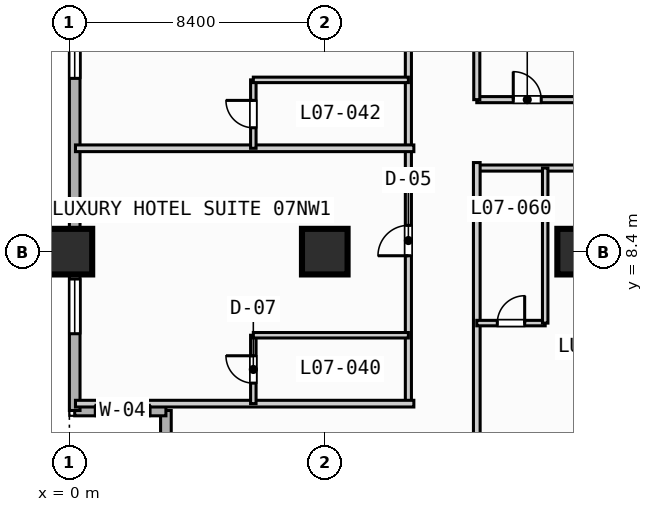
"""IFC4 building model, lengths in metres.
Left out: names, types, materials, properties, quantities, classifications, styles, units other than length and angle.
Written with IfcOpenShell. Run it as: python <this file> out.ifc"""

import sys

from ifc_helpers import new_model, si_unit, direction, frame, frame_2d, origin, origin_2d, place, context, subcontext, project, spatial, rectangle, extrude, element, fill, save


model = new_model("IFC4")
c1 = context("Model", 3, precision=1e-05, world=origin(), true_north=direction((0.0, 1.0)))
c2 = subcontext(c1, "Body", "Model", "MODEL_VIEW")
j1 = project(units=[si_unit("LENGTHUNIT", "METRE"), si_unit("PLANEANGLEUNIT", "RADIAN")], contexts=[c1])
p1 = place(None, origin())
s1 = spatial("IfcSite", under=j1, at=p1, CompositionType="ELEMENT")
p2 = place(p1, origin())
s2 = spatial("IfcBuilding", under=s1, at=p2, CompositionType="ELEMENT")
p3 = place(p2, frame((0.0, 0.0, 35.8)))
s3 = spatial("IfcBuildingStorey", under=s2, at=p3, CompositionType="ELEMENT", Elevation=35.8)
for number, where, z_axis, x_axis in (
    (1, (0.0, 8.4, 0.0), (0.0, 0.0, 1.0), (1.0, 0.0, 0.0)),
    (2, (8.4, 8.4, 0.0), (0.0, 0.0, 1.0), (1.0, 0.0, 0.0)),
    (3, (16.8, 8.4, 0.0), (0.0, 0.0, 1.0), (1.0, 0.0, 0.0)),
):
    element("IfcColumn", number, at=place(p3, frame(where, z_axis=z_axis, x_axis=x_axis)), inside=s3, PredefinedType="COLUMN", context=c2, shape_type="SweptSolid", body=[
        extrude(rectangle(XDim=1.5, YDim=1.5, at=origin_2d()), origin(), (0.0, 0.0, 1.0), 3.8),
    ])
p4 = place(p3, frame((3.175, 0.175, 0.0), z_axis=(0.0, 0.0, 1.0), x_axis=(0.0, 1.0, 0.0)))
e4 = element("IfcWall", 4, at=p4, inside=s3, PredefinedType="STANDARD", context=c2, shape_type="SweptSolid", body=[
    extrude(rectangle(XDim=3.0, YDim=0.35, at=frame_2d((1.5, 0.0))), origin(), (0.0, 0.0, 1.0), 3.55),
])
p5 = place(p3, frame((3.175, 3.175, 0.0), z_axis=(0.0, 0.0, 1.0), x_axis=(-1.0, 0.0, 0.0)))
e5 = element("IfcWall", 5, at=p5, inside=s3, PredefinedType="STANDARD", context=c2, shape_type="SweptSolid", body=[
    extrude(rectangle(XDim=3.0, YDim=0.35, at=frame_2d((1.5, 0.0))), origin(), (0.0, 0.0, 1.0), 3.55),
])
p6 = place(p5, frame((0.522, 0.0, 0.85)))
e6 = element("IfcOpeningElement", 6, at=p6, cuts=e5, PredefinedType="OPENING", context=c2, shape_type="SweptSolid", body=[
    extrude(rectangle(XDim=1.8, YDim=1.8, at=frame_2d((0.9, 0.9))), frame((0.0, 0.185, 0.0), z_axis=(0.0, -1.0, 0.0), x_axis=(1.0, 0.0, 0.0)), (0.0, 0.0, 1.0), 0.37),
])
p7 = place(p3, frame((0.175, 3.175, 0.0), z_axis=(0.0, 0.0, 1.0), x_axis=(0.0, 1.0, 0.0)))
e7 = element("IfcWall", 7, at=p7, inside=s3, PredefinedType="STANDARD", context=c2, shape_type="SweptSolid", body=[
    extrude(rectangle(XDim=86.05, YDim=0.35, at=frame_2d((43.025, 0.0))), origin(), (0.0, 0.0, 1.0), 3.55),
])
p8 = place(p7, frame((42.825, 0.0, 0.0)))
e8 = element("IfcOpeningElement", 8, at=p8, cuts=e7, PredefinedType="OPENING", context=c2, shape_type="SweptSolid", body=[
    extrude(rectangle(XDim=1.4, YDim=2.2, at=frame_2d((0.7, 1.1))), frame((0.0, 0.185, 0.0), z_axis=(0.0, -1.0, 0.0), x_axis=(1.0, 0.0, 0.0)), (0.0, 0.0, 1.0), 0.37),
])
p9 = place(p7, frame((2.525, 0.0, 0.85)))
e9 = element("IfcOpeningElement", 9, at=p9, cuts=e7, PredefinedType="OPENING", context=c2, shape_type="SweptSolid", body=[
    extrude(rectangle(XDim=1.8, YDim=1.8, at=frame_2d((0.9, 0.9))), frame((0.0, 0.185, 0.0), z_axis=(0.0, -1.0, 0.0), x_axis=(1.0, 0.0, 0.0)), (0.0, 0.0, 1.0), 0.37),
])
p10 = place(p7, frame((10.925, 0.0, 0.85)))
e10 = element("IfcOpeningElement", 10, at=p10, cuts=e7, PredefinedType="OPENING", context=c2, shape_type="SweptSolid", body=[
    extrude(rectangle(XDim=1.8, YDim=1.8, at=frame_2d((0.9, 0.9))), frame((0.0, 0.185, 0.0), z_axis=(0.0, -1.0, 0.0), x_axis=(1.0, 0.0, 0.0)), (0.0, 0.0, 1.0), 0.37),
])
p11 = place(p7, frame((19.325, 0.0, 0.85)))
e11 = element("IfcOpeningElement", 11, at=p11, cuts=e7, PredefinedType="OPENING", context=c2, shape_type="SweptSolid", body=[
    extrude(rectangle(XDim=1.8, YDim=1.8, at=frame_2d((0.9, 0.9))), frame((0.0, 0.185, 0.0), z_axis=(0.0, -1.0, 0.0), x_axis=(1.0, 0.0, 0.0)), (0.0, 0.0, 1.0), 0.37),
])
p12 = place(p7, frame((27.725, 0.0, 0.85)))
e12 = element("IfcOpeningElement", 12, at=p12, cuts=e7, PredefinedType="OPENING", context=c2, shape_type="SweptSolid", body=[
    extrude(rectangle(XDim=1.8, YDim=1.8, at=frame_2d((0.9, 0.9))), frame((0.0, 0.185, 0.0), z_axis=(0.0, -1.0, 0.0), x_axis=(1.0, 0.0, 0.0)), (0.0, 0.0, 1.0), 0.37),
])
p13 = place(p7, frame((36.125, 0.0, 0.85)))
e13 = element("IfcOpeningElement", 13, at=p13, cuts=e7, PredefinedType="OPENING", context=c2, shape_type="SweptSolid", body=[
    extrude(rectangle(XDim=1.8, YDim=1.8, at=frame_2d((0.9, 0.9))), frame((0.0, 0.185, 0.0), z_axis=(0.0, -1.0, 0.0), x_axis=(1.0, 0.0, 0.0)), (0.0, 0.0, 1.0), 0.37),
])
p14 = place(p7, frame((52.925, 0.0, 0.85)))
e14 = element("IfcOpeningElement", 14, at=p14, cuts=e7, PredefinedType="OPENING", context=c2, shape_type="SweptSolid", body=[
    extrude(rectangle(XDim=1.8, YDim=1.8, at=frame_2d((0.9, 0.9))), frame((0.0, 0.185, 0.0), z_axis=(0.0, -1.0, 0.0), x_axis=(1.0, 0.0, 0.0)), (0.0, 0.0, 1.0), 0.37),
])
p15 = place(p7, frame((61.325, 0.0, 0.85)))
e15 = element("IfcOpeningElement", 15, at=p15, cuts=e7, PredefinedType="OPENING", context=c2, shape_type="SweptSolid", body=[
    extrude(rectangle(XDim=1.8, YDim=1.8, at=frame_2d((0.9, 0.9))), frame((0.0, 0.185, 0.0), z_axis=(0.0, -1.0, 0.0), x_axis=(1.0, 0.0, 0.0)), (0.0, 0.0, 1.0), 0.37),
])
p16 = place(p7, frame((69.725, 0.0, 0.85)))
e16 = element("IfcOpeningElement", 16, at=p16, cuts=e7, PredefinedType="OPENING", context=c2, shape_type="SweptSolid", body=[
    extrude(rectangle(XDim=1.8, YDim=1.8, at=frame_2d((0.9, 0.9))), frame((0.0, 0.185, 0.0), z_axis=(0.0, -1.0, 0.0), x_axis=(1.0, 0.0, 0.0)), (0.0, 0.0, 1.0), 0.37),
])
p17 = place(p7, frame((78.075, 0.0, 0.85)))
e17 = element("IfcOpeningElement", 17, at=p17, cuts=e7, PredefinedType="OPENING", context=c2, shape_type="SweptSolid", body=[
    extrude(rectangle(XDim=1.8, YDim=1.8, at=frame_2d((0.9, 0.9))), frame((0.0, 0.185, 0.0), z_axis=(0.0, -1.0, 0.0), x_axis=(1.0, 0.0, 0.0)), (0.0, 0.0, 1.0), 0.37),
])
p18 = place(p3, frame((13.4, 13.4, 0.0), z_axis=(0.0, 0.0, 1.0), x_axis=(1.0, 0.0, 0.0)))
e18 = element("IfcWall", 18, at=p18, inside=s3, PredefinedType="PARTITIONING", context=c2, shape_type="SweptSolid", body=[
    extrude(rectangle(XDim=10.2, YDim=0.2, at=frame_2d((5.1, 0.0))), origin(), (0.0, 0.0, 1.0), 3.55),
])
p19 = place(p18, frame((1.2, 0.0, 0.0)))
e19 = element("IfcOpeningElement", 19, at=p19, cuts=e18, PredefinedType="OPENING", context=c2, shape_type="SweptSolid", body=[
    extrude(rectangle(XDim=0.92, YDim=2.1, at=frame_2d((0.46, 1.05))), frame((0.0, 0.11, 0.0), z_axis=(0.0, -1.0, 0.0), x_axis=(1.0, 0.0, 0.0)), (0.0, 0.0, 1.0), 0.22),
])
p20 = place(p18, frame((6.4, 0.0, 0.0)))
e20 = element("IfcOpeningElement", 20, at=p20, cuts=e18, PredefinedType="OPENING", context=c2, shape_type="SweptSolid", body=[
    extrude(rectangle(XDim=0.92, YDim=2.1, at=frame_2d((0.46, 1.05))), frame((0.0, 0.11, 0.0), z_axis=(0.0, -1.0, 0.0), x_axis=(1.0, 0.0, 0.0)), (0.0, 0.0, 1.0), 0.22),
])
p21 = place(p3, frame((13.4, 13.4, 0.0), z_axis=(0.0, 0.0, 1.0), x_axis=(0.0, 1.0, 0.0)))
e21 = element("IfcWall", 21, at=p21, inside=s3, PredefinedType="PARTITIONING", context=c2, shape_type="SweptSolid", body=[
    extrude(rectangle(XDim=11.6, YDim=0.2, at=frame_2d((5.8, 0.0))), origin(), (0.0, 0.0, 1.0), 3.55),
])
p22 = place(p3, frame((11.15, 3.4, 0.0), z_axis=(0.0, 0.0, 1.0), x_axis=(0.0, 1.0, 0.0)))
e22 = element("IfcWall", 22, at=p22, inside=s3, PredefinedType="PARTITIONING", context=c2, shape_type="SweptSolid", body=[
    extrude(rectangle(XDim=85.4, YDim=0.2, at=frame_2d((42.7, 0.0))), origin(), (0.0, 0.0, 1.0), 3.55),
])
p23 = place(p22, frame((4.865, 0.0, 0.0)))
e23 = element("IfcOpeningElement", 23, at=p23, cuts=e22, PredefinedType="OPENING", context=c2, shape_type="SweptSolid", body=[
    extrude(rectangle(XDim=1.0, YDim=2.15, at=frame_2d((0.5, 1.075))), frame((0.0, 0.11, 0.0), z_axis=(0.0, -1.0, 0.0), x_axis=(1.0, 0.0, 0.0)), (0.0, 0.0, 1.0), 0.22),
])
p24 = place(p22, frame((13.265, 0.0, 0.0)))
e24 = element("IfcOpeningElement", 24, at=p24, cuts=e22, PredefinedType="OPENING", context=c2, shape_type="SweptSolid", body=[
    extrude(rectangle(XDim=1.0, YDim=2.15, at=frame_2d((0.5, 1.075))), frame((0.0, 0.11, 0.0), z_axis=(0.0, -1.0, 0.0), x_axis=(1.0, 0.0, 0.0)), (0.0, 0.0, 1.0), 0.22),
])
p25 = place(p22, frame((21.665, 0.0, 0.0)))
e25 = element("IfcOpeningElement", 25, at=p25, cuts=e22, PredefinedType="OPENING", context=c2, shape_type="SweptSolid", body=[
    extrude(rectangle(XDim=1.0, YDim=2.15, at=frame_2d((0.5, 1.075))), frame((0.0, 0.11, 0.0), z_axis=(0.0, -1.0, 0.0), x_axis=(1.0, 0.0, 0.0)), (0.0, 0.0, 1.0), 0.22),
])
p26 = place(p22, frame((30.065, 0.0, 0.0)))
e26 = element("IfcOpeningElement", 26, at=p26, cuts=e22, PredefinedType="OPENING", context=c2, shape_type="SweptSolid", body=[
    extrude(rectangle(XDim=1.0, YDim=2.15, at=frame_2d((0.5, 1.075))), frame((0.0, 0.11, 0.0), z_axis=(0.0, -1.0, 0.0), x_axis=(1.0, 0.0, 0.0)), (0.0, 0.0, 1.0), 0.22),
])
p27 = place(p22, frame((38.465, 0.0, 0.0)))
e27 = element("IfcOpeningElement", 27, at=p27, cuts=e22, PredefinedType="OPENING", context=c2, shape_type="SweptSolid", body=[
    extrude(rectangle(XDim=1.0, YDim=2.15, at=frame_2d((0.5, 1.075))), frame((0.0, 0.11, 0.0), z_axis=(0.0, -1.0, 0.0), x_axis=(1.0, 0.0, 0.0)), (0.0, 0.0, 1.0), 0.22),
])
p28 = place(p22, frame((46.865, 0.0, 0.0)))
e28 = element("IfcOpeningElement", 28, at=p28, cuts=e22, PredefinedType="OPENING", context=c2, shape_type="SweptSolid", body=[
    extrude(rectangle(XDim=1.0, YDim=2.15, at=frame_2d((0.5, 1.075))), frame((0.0, 0.11, 0.0), z_axis=(0.0, -1.0, 0.0), x_axis=(1.0, 0.0, 0.0)), (0.0, 0.0, 1.0), 0.22),
])
p29 = place(p22, frame((55.265, 0.0, 0.0)))
e29 = element("IfcOpeningElement", 29, at=p29, cuts=e22, PredefinedType="OPENING", context=c2, shape_type="SweptSolid", body=[
    extrude(rectangle(XDim=1.0, YDim=2.15, at=frame_2d((0.5, 1.075))), frame((0.0, 0.11, 0.0), z_axis=(0.0, -1.0, 0.0), x_axis=(1.0, 0.0, 0.0)), (0.0, 0.0, 1.0), 0.22),
])
p30 = place(p22, frame((63.665, 0.0, 0.0)))
e30 = element("IfcOpeningElement", 30, at=p30, cuts=e22, PredefinedType="OPENING", context=c2, shape_type="SweptSolid", body=[
    extrude(rectangle(XDim=1.0, YDim=2.15, at=frame_2d((0.5, 1.075))), frame((0.0, 0.11, 0.0), z_axis=(0.0, -1.0, 0.0), x_axis=(1.0, 0.0, 0.0)), (0.0, 0.0, 1.0), 0.22),
])
p31 = place(p22, frame((72.065, 0.0, 0.0)))
e31 = element("IfcOpeningElement", 31, at=p31, cuts=e22, PredefinedType="OPENING", context=c2, shape_type="SweptSolid", body=[
    extrude(rectangle(XDim=1.0, YDim=2.15, at=frame_2d((0.5, 1.075))), frame((0.0, 0.11, 0.0), z_axis=(0.0, -1.0, 0.0), x_axis=(1.0, 0.0, 0.0)), (0.0, 0.0, 1.0), 0.22),
])
p32 = place(p22, frame((81.165, 0.0, 0.0)))
e32 = element("IfcOpeningElement", 32, at=p32, cuts=e22, PredefinedType="OPENING", context=c2, shape_type="SweptSolid", body=[
    extrude(rectangle(XDim=1.0, YDim=2.15, at=frame_2d((0.5, 1.075))), frame((0.0, 0.11, 0.0), z_axis=(0.0, -1.0, 0.0), x_axis=(1.0, 0.0, 0.0)), (0.0, 0.0, 1.0), 0.22),
])
p33 = place(p3, frame((0.2, 3.4, 0.0), z_axis=(0.0, 0.0, 1.0), x_axis=(1.0, 0.0, 0.0)))
e33 = element("IfcWall", 33, at=p33, inside=s3, PredefinedType="PARTITIONING", context=c2, shape_type="SweptSolid", body=[
    extrude(rectangle(XDim=11.13, YDim=0.22, at=frame_2d((5.565, 0.0))), origin(), (0.0, 0.0, 1.0), 3.55),
])
p34 = place(p3, frame((6.05, 3.4, 0.0), z_axis=(0.0, 0.0, 1.0), x_axis=(0.0, 1.0, 0.0)))
e34 = element("IfcWall", 34, at=p34, inside=s3, PredefinedType="PLUMBINGWALL", context=c2, shape_type="SweptSolid", body=[
    extrude(rectangle(XDim=2.25, YDim=0.18, at=frame_2d((1.125, 0.0))), origin(), (0.0, 0.0, 1.0), 3.55),
])
p35 = place(p34, frame((0.675, 0.0, 0.0)))
e35 = element("IfcOpeningElement", 35, at=p35, cuts=e34, PredefinedType="OPENING", context=c2, shape_type="SweptSolid", body=[
    extrude(rectangle(XDim=0.9, YDim=2.1, at=frame_2d((0.45, 1.05))), frame((0.0, 0.1, 0.0), z_axis=(0.0, -1.0, 0.0), x_axis=(1.0, 0.0, 0.0)), (0.0, 0.0, 1.0), 0.2),
])
p36 = place(p3, frame((6.05, 5.65, 0.0), z_axis=(0.0, 0.0, 1.0), x_axis=(1.0, 0.0, 0.0)))
e36 = element("IfcWall", 36, at=p36, inside=s3, PredefinedType="PLUMBINGWALL", context=c2, shape_type="SweptSolid", body=[
    extrude(rectangle(XDim=5.1, YDim=0.18, at=frame_2d((2.55, 0.0))), origin(), (0.0, 0.0, 1.0), 3.55),
])
p37 = place(p3, frame((0.2, 11.8, 0.0), z_axis=(0.0, 0.0, 1.0), x_axis=(1.0, 0.0, 0.0)))
e37 = element("IfcWall", 37, at=p37, inside=s3, PredefinedType="PARTITIONING", context=c2, shape_type="SweptSolid", body=[
    extrude(rectangle(XDim=11.13, YDim=0.22, at=frame_2d((5.565, 0.0))), origin(), (0.0, 0.0, 1.0), 3.55),
])
p38 = place(p3, frame((6.05, 11.8, 0.0), z_axis=(0.0, 0.0, 1.0), x_axis=(0.0, 1.0, 0.0)))
e38 = element("IfcWall", 38, at=p38, inside=s3, PredefinedType="PLUMBINGWALL", context=c2, shape_type="SweptSolid", body=[
    extrude(rectangle(XDim=2.25, YDim=0.18, at=frame_2d((1.125, 0.0))), origin(), (0.0, 0.0, 1.0), 3.55),
])
p39 = place(p38, frame((0.675, 0.0, 0.0)))
e39 = element("IfcOpeningElement", 39, at=p39, cuts=e38, PredefinedType="OPENING", context=c2, shape_type="SweptSolid", body=[
    extrude(rectangle(XDim=0.9, YDim=2.1, at=frame_2d((0.45, 1.05))), frame((0.0, 0.1, 0.0), z_axis=(0.0, -1.0, 0.0), x_axis=(1.0, 0.0, 0.0)), (0.0, 0.0, 1.0), 0.2),
])
p40 = place(p3, frame((6.05, 14.05, 0.0), z_axis=(0.0, 0.0, 1.0), x_axis=(1.0, 0.0, 0.0)))
e40 = element("IfcWall", 40, at=p40, inside=s3, PredefinedType="PLUMBINGWALL", context=c2, shape_type="SweptSolid", body=[
    extrude(rectangle(XDim=5.1, YDim=0.18, at=frame_2d((2.55, 0.0))), origin(), (0.0, 0.0, 1.0), 3.55),
])
p41 = place(p3, frame((13.4, 11.15, 0.0), z_axis=(0.0, 0.0, 1.0), x_axis=(1.0, 0.0, 0.0)))
e41 = element("IfcWall", 41, at=p41, inside=s3, PredefinedType="PARTITIONING", context=c2, shape_type="SweptSolid", body=[
    extrude(rectangle(XDim=75.4, YDim=0.2, at=frame_2d((37.7, 0.0))), origin(), (0.0, 0.0, 1.0), 3.55),
])
p42 = place(p41, frame((6.065, 0.0, 0.0)))
e42 = element("IfcOpeningElement", 42, at=p42, cuts=e41, PredefinedType="OPENING", context=c2, shape_type="SweptSolid", body=[
    extrude(rectangle(XDim=1.0, YDim=2.15, at=frame_2d((0.5, 1.075))), frame((0.0, 0.11, 0.0), z_axis=(0.0, -1.0, 0.0), x_axis=(1.0, 0.0, 0.0)), (0.0, 0.0, 1.0), 0.22),
])
p43 = place(p41, frame((13.36, 0.0, 0.0)))
e43 = element("IfcOpeningElement", 43, at=p43, cuts=e41, PredefinedType="OPENING", context=c2, shape_type="SweptSolid", body=[
    extrude(rectangle(XDim=1.0, YDim=2.15, at=frame_2d((0.5, 1.075))), frame((0.0, 0.11, 0.0), z_axis=(0.0, -1.0, 0.0), x_axis=(1.0, 0.0, 0.0)), (0.0, 0.0, 1.0), 0.22),
])
p44 = place(p41, frame((21.785, 0.0, 0.0)))
e44 = element("IfcOpeningElement", 44, at=p44, cuts=e41, PredefinedType="OPENING", context=c2, shape_type="SweptSolid", body=[
    extrude(rectangle(XDim=1.0, YDim=2.15, at=frame_2d((0.5, 1.075))), frame((0.0, 0.11, 0.0), z_axis=(0.0, -1.0, 0.0), x_axis=(1.0, 0.0, 0.0)), (0.0, 0.0, 1.0), 0.22),
])
p45 = place(p41, frame((30.185, 0.0, 0.0)))
e45 = element("IfcOpeningElement", 45, at=p45, cuts=e41, PredefinedType="OPENING", context=c2, shape_type="SweptSolid", body=[
    extrude(rectangle(XDim=1.0, YDim=2.15, at=frame_2d((0.5, 1.075))), frame((0.0, 0.11, 0.0), z_axis=(0.0, -1.0, 0.0), x_axis=(1.0, 0.0, 0.0)), (0.0, 0.0, 1.0), 0.22),
])
p46 = place(p41, frame((41.76, 0.0, 0.0)))
e46 = element("IfcOpeningElement", 46, at=p46, cuts=e41, PredefinedType="OPENING", context=c2, shape_type="SweptSolid", body=[
    extrude(rectangle(XDim=1.0, YDim=2.15, at=frame_2d((0.5, 1.075))), frame((0.0, 0.11, 0.0), z_axis=(0.0, -1.0, 0.0), x_axis=(1.0, 0.0, 0.0)), (0.0, 0.0, 1.0), 0.22),
])
p47 = place(p41, frame((54.36, 0.0, 0.0)))
e47 = element("IfcOpeningElement", 47, at=p47, cuts=e41, PredefinedType="OPENING", context=c2, shape_type="SweptSolid", body=[
    extrude(rectangle(XDim=1.0, YDim=2.15, at=frame_2d((0.5, 1.075))), frame((0.0, 0.11, 0.0), z_axis=(0.0, -1.0, 0.0), x_axis=(1.0, 0.0, 0.0)), (0.0, 0.0, 1.0), 0.22),
])
p48 = place(p41, frame((63.785, 0.0, 0.0)))
e48 = element("IfcOpeningElement", 48, at=p48, cuts=e41, PredefinedType="OPENING", context=c2, shape_type="SweptSolid", body=[
    extrude(rectangle(XDim=1.0, YDim=2.15, at=frame_2d((0.5, 1.075))), frame((0.0, 0.11, 0.0), z_axis=(0.0, -1.0, 0.0), x_axis=(1.0, 0.0, 0.0)), (0.0, 0.0, 1.0), 0.22),
])
p49 = place(p41, frame((70.86, 0.0, 0.0)))
e49 = element("IfcOpeningElement", 49, at=p49, cuts=e41, PredefinedType="OPENING", context=c2, shape_type="SweptSolid", body=[
    extrude(rectangle(XDim=1.0, YDim=2.15, at=frame_2d((0.5, 1.075))), frame((0.0, 0.11, 0.0), z_axis=(0.0, -1.0, 0.0), x_axis=(1.0, 0.0, 0.0)), (0.0, 0.0, 1.0), 0.22),
])
p50 = place(p3, frame((13.4, 0.2, 0.0), z_axis=(0.0, 0.0, 1.0), x_axis=(0.0, 1.0, 0.0)))
e50 = element("IfcWall", 50, at=p50, inside=s3, PredefinedType="PARTITIONING", context=c2, shape_type="SweptSolid", body=[
    extrude(rectangle(XDim=11.13, YDim=0.22, at=frame_2d((5.565, 0.0))), origin(), (0.0, 0.0, 1.0), 3.55),
])
p51 = place(p3, frame((13.4, 6.05, 0.0), z_axis=(0.0, 0.0, 1.0), x_axis=(1.0, 0.0, 0.0)))
e51 = element("IfcWall", 51, at=p51, inside=s3, PredefinedType="PLUMBINGWALL", context=c2, shape_type="SweptSolid", body=[
    extrude(rectangle(XDim=2.25, YDim=0.18, at=frame_2d((1.125, 0.0))), origin(), (0.0, 0.0, 1.0), 3.55),
])
p52 = place(p51, frame((0.675, 0.0, 0.0)))
e52 = element("IfcOpeningElement", 52, at=p52, cuts=e51, PredefinedType="OPENING", context=c2, shape_type="SweptSolid", body=[
    extrude(rectangle(XDim=0.9, YDim=2.1, at=frame_2d((0.45, 1.05))), frame((0.0, 0.1, 0.0), z_axis=(0.0, -1.0, 0.0), x_axis=(1.0, 0.0, 0.0)), (0.0, 0.0, 1.0), 0.2),
])
p53 = place(p3, frame((15.65, 6.05, 0.0), z_axis=(0.0, 0.0, 1.0), x_axis=(0.0, 1.0, 0.0)))
e53 = element("IfcWall", 53, at=p53, inside=s3, PredefinedType="PLUMBINGWALL", context=c2, shape_type="SweptSolid", body=[
    extrude(rectangle(XDim=5.1, YDim=0.18, at=frame_2d((2.55, 0.0))), origin(), (0.0, 0.0, 1.0), 3.55),
])
p54 = place(p6, origin())
e54 = element("IfcWindow", 54, at=p54, inside=s3, PartitioningType="SINGLE_PANEL", PredefinedType="WINDOW", context=c2, shape_type="SweptSolid", body=[
    extrude(rectangle(XDim=1.8, YDim=1.8, at=frame_2d((0.9, 0.9))), frame((0.0, 0.03, 0.0), z_axis=(0.0, -1.0, 0.0), x_axis=(1.0, 0.0, 0.0)), (0.0, 0.0, 1.0), 0.06),
])
fill(e6, e54)
p55 = place(p9, origin())
e55 = element("IfcWindow", 55, at=p55, inside=s3, PartitioningType="SINGLE_PANEL", PredefinedType="WINDOW", context=c2, shape_type="SweptSolid", body=[
    extrude(rectangle(XDim=1.8, YDim=1.8, at=frame_2d((0.9, 0.9))), frame((0.0, 0.03, 0.0), z_axis=(0.0, -1.0, 0.0), x_axis=(1.0, 0.0, 0.0)), (0.0, 0.0, 1.0), 0.06),
])
fill(e9, e55)
p56 = place(p10, origin())
e56 = element("IfcWindow", 56, at=p56, inside=s3, PartitioningType="SINGLE_PANEL", PredefinedType="WINDOW", context=c2, shape_type="SweptSolid", body=[
    extrude(rectangle(XDim=1.8, YDim=1.8, at=frame_2d((0.9, 0.9))), frame((0.0, 0.03, 0.0), z_axis=(0.0, -1.0, 0.0), x_axis=(1.0, 0.0, 0.0)), (0.0, 0.0, 1.0), 0.06),
])
fill(e10, e56)
p57 = place(p19, origin())
e57 = element("IfcDoor", 57, at=p57, inside=s3, OperationType="SINGLE_SWING_LEFT", PredefinedType="DOOR", context=c2, shape_type="SweptSolid", body=[
    extrude(rectangle(XDim=0.92, YDim=2.1, at=frame_2d((0.46, 1.05))), frame((0.0, 0.025, 0.0), z_axis=(0.0, -1.0, 0.0), x_axis=(1.0, 0.0, 0.0)), (0.0, 0.0, 1.0), 0.05),
])
fill(e19, e57)
p58 = place(p23, origin())
e58 = element("IfcDoor", 58, at=p58, inside=s3, OperationType="SINGLE_SWING_LEFT", PredefinedType="DOOR", context=c2, shape_type="SweptSolid", body=[
    extrude(rectangle(XDim=1.0, YDim=2.15, at=frame_2d((0.5, 1.075))), frame((0.0, 0.025, 0.0), z_axis=(0.0, -1.0, 0.0), x_axis=(1.0, 0.0, 0.0)), (0.0, 0.0, 1.0), 0.05),
])
fill(e23, e58)
p59 = place(p35, origin())
e59 = element("IfcDoor", 59, at=p59, inside=s3, OperationType="SINGLE_SWING_RIGHT", PredefinedType="DOOR", context=c2, shape_type="SweptSolid", body=[
    extrude(rectangle(XDim=0.9, YDim=2.1, at=frame_2d((0.45, 1.05))), frame((0.0, 0.025, 0.0), z_axis=(0.0, -1.0, 0.0), x_axis=(1.0, 0.0, 0.0)), (0.0, 0.0, 1.0), 0.05),
])
fill(e35, e59)
p60 = place(p39, origin())
e60 = element("IfcDoor", 60, at=p60, inside=s3, OperationType="SINGLE_SWING_RIGHT", PredefinedType="DOOR", context=c2, shape_type="SweptSolid", body=[
    extrude(rectangle(XDim=0.9, YDim=2.1, at=frame_2d((0.45, 1.05))), frame((0.0, 0.025, 0.0), z_axis=(0.0, -1.0, 0.0), x_axis=(1.0, 0.0, 0.0)), (0.0, 0.0, 1.0), 0.05),
])
fill(e39, e60)
p61 = place(p52, origin())
e61 = element("IfcDoor", 61, at=p61, inside=s3, OperationType="SINGLE_SWING_RIGHT", PredefinedType="DOOR", context=c2, shape_type="SweptSolid", body=[
    extrude(rectangle(XDim=0.9, YDim=2.1, at=frame_2d((0.45, 1.05))), frame((0.0, 0.025, 0.0), z_axis=(0.0, -1.0, 0.0), x_axis=(1.0, 0.0, 0.0)), (0.0, 0.0, 1.0), 0.05),
])
fill(e52, e61)
save(model, sys.argv[1])
